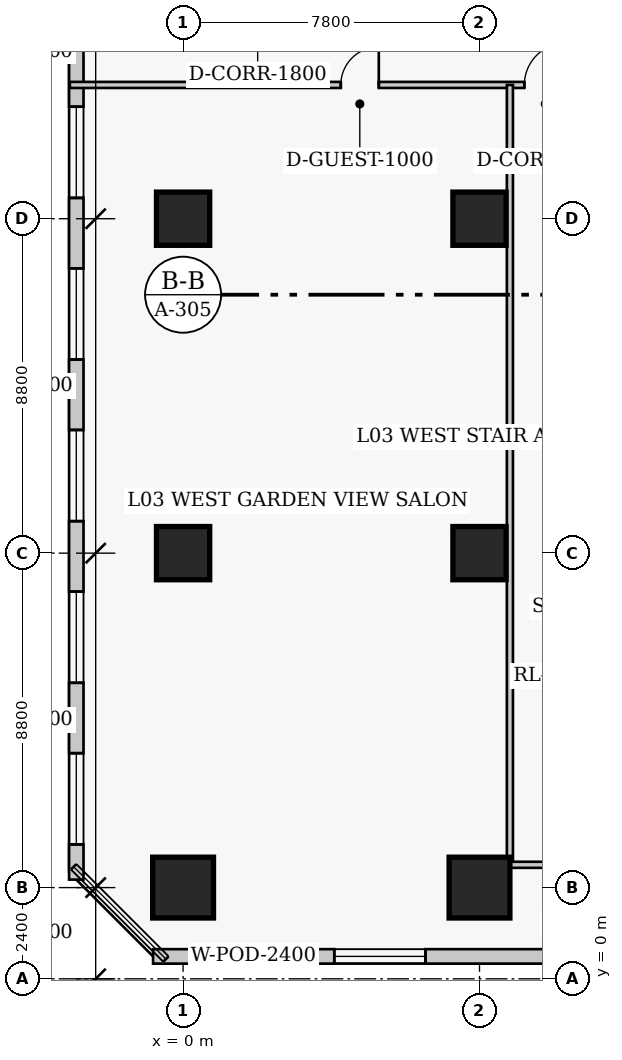
"""IFC4 building model, lengths in metres.
Left out: names, types, materials, properties, quantities, classifications, styles, units other than length and angle.
Written with IfcOpenShell. Run it as: python <this file> out.ifc"""

import sys

from ifc_helpers import new_model, si_unit, direction, frame, frame_2d, origin, origin_2d, place, context, subcontext, project, spatial, rectangle, extrude, element, fill, save


model = new_model("IFC4")
c1 = context("Model", 3, precision=1e-05, world=origin(), true_north=direction((0.0, 1.0)))
c2 = subcontext(c1, "Body", "Model", "MODEL_VIEW")
j1 = project(units=[si_unit("LENGTHUNIT", "METRE"), si_unit("PLANEANGLEUNIT", "RADIAN")], contexts=[c1])
p1 = place(None, origin())
s1 = spatial("IfcSite", under=j1, at=p1, CompositionType="ELEMENT")
p2 = place(p1, origin())
s2 = spatial("IfcBuilding", under=s1, at=p2, CompositionType="ELEMENT")
p3 = place(p2, frame((0.0, 0.0, 15.8)))
s3 = spatial("IfcBuildingStorey", under=s2, at=p3, CompositionType="ELEMENT", Elevation=15.8)
p4 = place(p3, frame((0.0, 2.4, 0.0), z_axis=(0.0, 0.0, 1.0), x_axis=(1.0, 0.0, 0.0)))
e1 = element("IfcColumn", 1, at=p4, inside=s3, PredefinedType="COLUMN", context=c2, shape_type="SweptSolid", body=[
    extrude(rectangle(XDim=1.6, YDim=1.6, at=origin_2d()), origin(), (0.0, 0.0, 1.0), 5.0),
])
for number, where, z_axis, x_axis in (
    (2, (0.0, 11.2, 0.0), (0.0, 0.0, 1.0), (1.0, 0.0, 0.0)),
    (3, (0.0, 20.0, 0.0), (0.0, 0.0, 1.0), (1.0, 0.0, 0.0)),
):
    element("IfcColumn", number, at=place(p3, frame(where, z_axis=z_axis, x_axis=x_axis)), inside=s3, PredefinedType="COLUMN", context=c2, shape_type="SweptSolid", body=[
        extrude(rectangle(XDim=1.4, YDim=1.4, at=origin_2d()), origin(), (0.0, 0.0, 1.0), 5.0),
    ])
p5 = place(p3, frame((7.8, 2.4, 0.0), z_axis=(0.0, 0.0, 1.0), x_axis=(1.0, 0.0, 0.0)))
e4 = element("IfcColumn", 4, at=p5, inside=s3, PredefinedType="COLUMN", context=c2, shape_type="SweptSolid", body=[
    extrude(rectangle(XDim=1.6, YDim=1.6, at=origin_2d()), origin(), (0.0, 0.0, 1.0), 5.0),
])
for number, where, z_axis, x_axis in (
    (5, (7.8, 11.2, 0.0), (0.0, 0.0, 1.0), (1.0, 0.0, 0.0)),
    (6, (7.8, 20.0, 0.0), (0.0, 0.0, 1.0), (1.0, 0.0, 0.0)),
):
    element("IfcColumn", number, at=place(p3, frame(where, z_axis=z_axis, x_axis=x_axis)), inside=s3, PredefinedType="COLUMN", context=c2, shape_type="SweptSolid", body=[
        extrude(rectangle(XDim=1.4, YDim=1.4, at=origin_2d()), origin(), (0.0, 0.0, 1.0), 5.0),
    ])
p6 = place(p3, frame((-0.79, 0.59, 0.0), z_axis=(0.0, 0.0, 1.0), x_axis=(1.0, 0.0, 0.0)))
e7 = element("IfcWall", 7, at=p6, inside=s3, PredefinedType="SOLIDWALL", context=c2, shape_type="SweptSolid", body=[
    extrude(rectangle(XDim=79.58, YDim=0.38, at=frame_2d((39.79, 0.0))), origin(), (0.0, 0.0, 1.0), 4.58),
])
p7 = place(p6, frame((1.439, 0.0, 0.75)))
e8 = element("IfcOpeningElement", 8, at=p7, cuts=e7, PredefinedType="OPENING", context=c2, shape_type="SweptSolid", body=[
    extrude(rectangle(XDim=2.4, YDim=2.2, at=frame_2d((1.2, 1.1))), frame((0.0, 0.2, 0.0), z_axis=(0.0, -1.0, 0.0), x_axis=(1.0, 0.0, 0.0)), (0.0, 0.0, 1.0), 0.4),
])
p8 = place(p6, frame((4.769, 0.0, 0.75)))
e9 = element("IfcOpeningElement", 9, at=p8, cuts=e7, PredefinedType="OPENING", context=c2, shape_type="SweptSolid", body=[
    extrude(rectangle(XDim=2.4, YDim=2.2, at=frame_2d((1.2, 1.1))), frame((0.0, 0.2, 0.0), z_axis=(0.0, -1.0, 0.0), x_axis=(1.0, 0.0, 0.0)), (0.0, 0.0, 1.0), 0.4),
])
p9 = place(p6, frame((16.706, 0.0, 0.75)))
e10 = element("IfcOpeningElement", 10, at=p9, cuts=e7, PredefinedType="OPENING", context=c2, shape_type="SweptSolid", body=[
    extrude(rectangle(XDim=2.4, YDim=2.2, at=frame_2d((1.2, 1.1))), frame((0.0, 0.2, 0.0), z_axis=(0.0, -1.0, 0.0), x_axis=(1.0, 0.0, 0.0)), (0.0, 0.0, 1.0), 0.4),
])
p10 = place(p6, frame((20.685, 0.0, 0.75)))
e11 = element("IfcOpeningElement", 11, at=p10, cuts=e7, PredefinedType="OPENING", context=c2, shape_type="SweptSolid", body=[
    extrude(rectangle(XDim=2.4, YDim=2.2, at=frame_2d((1.2, 1.1))), frame((0.0, 0.2, 0.0), z_axis=(0.0, -1.0, 0.0), x_axis=(1.0, 0.0, 0.0)), (0.0, 0.0, 1.0), 0.4),
])
p11 = place(p6, frame((24.664, 0.0, 0.75)))
e12 = element("IfcOpeningElement", 12, at=p11, cuts=e7, PredefinedType="OPENING", context=c2, shape_type="SweptSolid", body=[
    extrude(rectangle(XDim=2.4, YDim=2.2, at=frame_2d((1.2, 1.1))), frame((0.0, 0.2, 0.0), z_axis=(0.0, -1.0, 0.0), x_axis=(1.0, 0.0, 0.0)), (0.0, 0.0, 1.0), 0.4),
])
p12 = place(p6, frame((28.643, 0.0, 0.75)))
e13 = element("IfcOpeningElement", 13, at=p12, cuts=e7, PredefinedType="OPENING", context=c2, shape_type="SweptSolid", body=[
    extrude(rectangle(XDim=2.4, YDim=2.2, at=frame_2d((1.2, 1.1))), frame((0.0, 0.2, 0.0), z_axis=(0.0, -1.0, 0.0), x_axis=(1.0, 0.0, 0.0)), (0.0, 0.0, 1.0), 0.4),
])
p13 = place(p6, frame((32.622, 0.0, 0.75)))
e14 = element("IfcOpeningElement", 14, at=p13, cuts=e7, PredefinedType="OPENING", context=c2, shape_type="SweptSolid", body=[
    extrude(rectangle(XDim=2.4, YDim=2.2, at=frame_2d((1.2, 1.1))), frame((0.0, 0.2, 0.0), z_axis=(0.0, -1.0, 0.0), x_axis=(1.0, 0.0, 0.0)), (0.0, 0.0, 1.0), 0.4),
])
p14 = place(p6, frame((37.75, 0.0, 0.75)))
e15 = element("IfcOpeningElement", 15, at=p14, cuts=e7, PredefinedType="OPENING", context=c2, shape_type="SweptSolid", body=[
    extrude(rectangle(XDim=2.4, YDim=2.2, at=frame_2d((1.2, 1.1))), frame((0.0, 0.2, 0.0), z_axis=(0.0, -1.0, 0.0), x_axis=(1.0, 0.0, 0.0)), (0.0, 0.0, 1.0), 0.4),
])
p15 = place(p6, frame((44.559, 0.0, 0.75)))
e16 = element("IfcOpeningElement", 16, at=p15, cuts=e7, PredefinedType="OPENING", context=c2, shape_type="SweptSolid", body=[
    extrude(rectangle(XDim=2.4, YDim=2.2, at=frame_2d((1.2, 1.1))), frame((0.0, 0.2, 0.0), z_axis=(0.0, -1.0, 0.0), x_axis=(1.0, 0.0, 0.0)), (0.0, 0.0, 1.0), 0.4),
])
p16 = place(p6, frame((48.538, 0.0, 0.75)))
e17 = element("IfcOpeningElement", 17, at=p16, cuts=e7, PredefinedType="OPENING", context=c2, shape_type="SweptSolid", body=[
    extrude(rectangle(XDim=2.4, YDim=2.2, at=frame_2d((1.2, 1.1))), frame((0.0, 0.2, 0.0), z_axis=(0.0, -1.0, 0.0), x_axis=(1.0, 0.0, 0.0)), (0.0, 0.0, 1.0), 0.4),
])
p17 = place(p6, frame((56.496, 0.0, 0.75)))
e18 = element("IfcOpeningElement", 18, at=p17, cuts=e7, PredefinedType="OPENING", context=c2, shape_type="SweptSolid", body=[
    extrude(rectangle(XDim=2.4, YDim=2.2, at=frame_2d((1.2, 1.1))), frame((0.0, 0.2, 0.0), z_axis=(0.0, -1.0, 0.0), x_axis=(1.0, 0.0, 0.0)), (0.0, 0.0, 1.0), 0.4),
])
p18 = place(p6, frame((60.475, 0.0, 0.75)))
e19 = element("IfcOpeningElement", 19, at=p18, cuts=e7, PredefinedType="OPENING", context=c2, shape_type="SweptSolid", body=[
    extrude(rectangle(XDim=2.4, YDim=2.2, at=frame_2d((1.2, 1.1))), frame((0.0, 0.2, 0.0), z_axis=(0.0, -1.0, 0.0), x_axis=(1.0, 0.0, 0.0)), (0.0, 0.0, 1.0), 0.4),
])
p19 = place(p6, frame((64.454, 0.0, 0.75)))
e20 = element("IfcOpeningElement", 20, at=p19, cuts=e7, PredefinedType="OPENING", context=c2, shape_type="SweptSolid", body=[
    extrude(rectangle(XDim=2.4, YDim=2.2, at=frame_2d((1.2, 1.1))), frame((0.0, 0.2, 0.0), z_axis=(0.0, -1.0, 0.0), x_axis=(1.0, 0.0, 0.0)), (0.0, 0.0, 1.0), 0.4),
])
p20 = place(p6, frame((68.433, 0.0, 0.75)))
e21 = element("IfcOpeningElement", 21, at=p20, cuts=e7, PredefinedType="OPENING", context=c2, shape_type="SweptSolid", body=[
    extrude(rectangle(XDim=2.4, YDim=2.2, at=frame_2d((1.2, 1.1))), frame((0.0, 0.2, 0.0), z_axis=(0.0, -1.0, 0.0), x_axis=(1.0, 0.0, 0.0)), (0.0, 0.0, 1.0), 0.4),
])
p21 = place(p6, frame((72.412, 0.0, 0.75)))
e22 = element("IfcOpeningElement", 22, at=p21, cuts=e7, PredefinedType="OPENING", context=c2, shape_type="SweptSolid", body=[
    extrude(rectangle(XDim=2.4, YDim=2.2, at=frame_2d((1.2, 1.1))), frame((0.0, 0.2, 0.0), z_axis=(0.0, -1.0, 0.0), x_axis=(1.0, 0.0, 0.0)), (0.0, 0.0, 1.0), 0.4),
])
p22 = place(p6, frame((75.74, 0.0, 0.75)))
e23 = element("IfcOpeningElement", 23, at=p22, cuts=e7, PredefinedType="OPENING", context=c2, shape_type="SweptSolid", body=[
    extrude(rectangle(XDim=2.4, YDim=2.2, at=frame_2d((1.2, 1.1))), frame((0.0, 0.2, 0.0), z_axis=(0.0, -1.0, 0.0), x_axis=(1.0, 0.0, 0.0)), (0.0, 0.0, 1.0), 0.4),
])
p23 = place(p3, frame((-2.81, 49.39, 0.0), z_axis=(0.0, 0.0, 1.0), x_axis=(0.0, -1.0, 0.0)))
e24 = element("IfcWall", 24, at=p23, inside=s3, PredefinedType="SOLIDWALL", context=c2, shape_type="SweptSolid", body=[
    extrude(rectangle(XDim=46.78, YDim=0.38, at=frame_2d((23.39, 0.0))), origin(), (0.0, 0.0, 1.0), 4.58),
])
p24 = place(p23, frame((0.927, 0.0, 0.75)))
e25 = element("IfcOpeningElement", 25, at=p24, cuts=e24, PredefinedType="OPENING", context=c2, shape_type="SweptSolid", body=[
    extrude(rectangle(XDim=2.4, YDim=2.2, at=frame_2d((1.2, 1.1))), frame((0.0, 0.2, 0.0), z_axis=(0.0, -1.0, 0.0), x_axis=(1.0, 0.0, 0.0)), (0.0, 0.0, 1.0), 0.4),
])
p25 = place(p23, frame((5.179, 0.0, 0.75)))
e26 = element("IfcOpeningElement", 26, at=p25, cuts=e24, PredefinedType="OPENING", context=c2, shape_type="SweptSolid", body=[
    extrude(rectangle(XDim=2.4, YDim=2.2, at=frame_2d((1.2, 1.1))), frame((0.0, 0.2, 0.0), z_axis=(0.0, -1.0, 0.0), x_axis=(1.0, 0.0, 0.0)), (0.0, 0.0, 1.0), 0.4),
])
p26 = place(p23, frame((9.432, 0.0, 0.75)))
e27 = element("IfcOpeningElement", 27, at=p26, cuts=e24, PredefinedType="OPENING", context=c2, shape_type="SweptSolid", body=[
    extrude(rectangle(XDim=2.4, YDim=2.2, at=frame_2d((1.2, 1.1))), frame((0.0, 0.2, 0.0), z_axis=(0.0, -1.0, 0.0), x_axis=(1.0, 0.0, 0.0)), (0.0, 0.0, 1.0), 0.4),
])
p27 = place(p23, frame((13.685, 0.0, 0.75)))
e28 = element("IfcOpeningElement", 28, at=p27, cuts=e24, PredefinedType="OPENING", context=c2, shape_type="SweptSolid", body=[
    extrude(rectangle(XDim=2.4, YDim=2.2, at=frame_2d((1.2, 1.1))), frame((0.0, 0.2, 0.0), z_axis=(0.0, -1.0, 0.0), x_axis=(1.0, 0.0, 0.0)), (0.0, 0.0, 1.0), 0.4),
])
p28 = place(p23, frame((17.937, 0.0, 0.75)))
e29 = element("IfcOpeningElement", 29, at=p28, cuts=e24, PredefinedType="OPENING", context=c2, shape_type="SweptSolid", body=[
    extrude(rectangle(XDim=2.4, YDim=2.2, at=frame_2d((1.2, 1.1))), frame((0.0, 0.2, 0.0), z_axis=(0.0, -1.0, 0.0), x_axis=(1.0, 0.0, 0.0)), (0.0, 0.0, 1.0), 0.4),
])
p29 = place(p23, frame((26.443, 0.0, 0.75)))
e30 = element("IfcOpeningElement", 30, at=p29, cuts=e24, PredefinedType="OPENING", context=c2, shape_type="SweptSolid", body=[
    extrude(rectangle(XDim=2.4, YDim=2.2, at=frame_2d((1.2, 1.1))), frame((0.0, 0.2, 0.0), z_axis=(0.0, -1.0, 0.0), x_axis=(1.0, 0.0, 0.0)), (0.0, 0.0, 1.0), 0.4),
])
p30 = place(p23, frame((30.696, 0.0, 0.75)))
e31 = element("IfcOpeningElement", 31, at=p30, cuts=e24, PredefinedType="OPENING", context=c2, shape_type="SweptSolid", body=[
    extrude(rectangle(XDim=2.4, YDim=2.2, at=frame_2d((1.2, 1.1))), frame((0.0, 0.2, 0.0), z_axis=(0.0, -1.0, 0.0), x_axis=(1.0, 0.0, 0.0)), (0.0, 0.0, 1.0), 0.4),
])
p31 = place(p23, frame((34.948, 0.0, 0.75)))
e32 = element("IfcOpeningElement", 32, at=p31, cuts=e24, PredefinedType="OPENING", context=c2, shape_type="SweptSolid", body=[
    extrude(rectangle(XDim=2.4, YDim=2.2, at=frame_2d((1.2, 1.1))), frame((0.0, 0.2, 0.0), z_axis=(0.0, -1.0, 0.0), x_axis=(1.0, 0.0, 0.0)), (0.0, 0.0, 1.0), 0.4),
])
p32 = place(p23, frame((39.201, 0.0, 0.75)))
e33 = element("IfcOpeningElement", 33, at=p32, cuts=e24, PredefinedType="OPENING", context=c2, shape_type="SweptSolid", body=[
    extrude(rectangle(XDim=2.4, YDim=2.2, at=frame_2d((1.2, 1.1))), frame((0.0, 0.2, 0.0), z_axis=(0.0, -1.0, 0.0), x_axis=(1.0, 0.0, 0.0)), (0.0, 0.0, 1.0), 0.4),
])
p33 = place(p23, frame((43.454, 0.0, 0.75)))
e34 = element("IfcOpeningElement", 34, at=p33, cuts=e24, PredefinedType="OPENING", context=c2, shape_type="SweptSolid", body=[
    extrude(rectangle(XDim=2.4, YDim=2.2, at=frame_2d((1.2, 1.1))), frame((0.0, 0.2, 0.0), z_axis=(0.0, -1.0, 0.0), x_axis=(1.0, 0.0, 0.0)), (0.0, 0.0, 1.0), 0.4),
])
p34 = place(p3, frame((-2.98, 23.52, 0.0), z_axis=(0.0, 0.0, 1.0), x_axis=(1.0, 0.0, 0.0)))
e35 = element("IfcWall", 35, at=p34, inside=s3, PredefinedType="PARTITIONING", context=c2, shape_type="SweptSolid", body=[
    extrude(rectangle(XDim=83.96, YDim=0.16, at=frame_2d((41.98, 0.0))), origin(), (0.0, 0.0, 1.0), 4.58),
])
p35 = place(p34, frame((7.13, 0.0, 0.0)))
e36 = element("IfcOpeningElement", 36, at=p35, cuts=e35, PredefinedType="OPENING", context=c2, shape_type="SweptSolid", body=[
    extrude(rectangle(XDim=1.0, YDim=2.15, at=frame_2d((0.5, 1.075))), frame((0.0, 0.09, 0.0), z_axis=(0.0, -1.0, 0.0), x_axis=(1.0, 0.0, 0.0)), (0.0, 0.0, 1.0), 0.18),
])
p36 = place(p34, frame((11.96, 0.0, 0.0)))
e37 = element("IfcOpeningElement", 37, at=p36, cuts=e35, PredefinedType="OPENING", context=c2, shape_type="SweptSolid", body=[
    extrude(rectangle(XDim=1.1, YDim=2.15, at=frame_2d((0.55, 1.075))), frame((0.0, 0.09, 0.0), z_axis=(0.0, -1.0, 0.0), x_axis=(1.0, 0.0, 0.0)), (0.0, 0.0, 1.0), 0.18),
])
p37 = place(p34, frame((15.205, 0.0, 0.0)))
e38 = element("IfcOpeningElement", 38, at=p37, cuts=e35, PredefinedType="OPENING", context=c2, shape_type="SweptSolid", body=[
    extrude(rectangle(XDim=0.95, YDim=2.1, at=frame_2d((0.475, 1.05))), frame((0.0, 0.09, 0.0), z_axis=(0.0, -1.0, 0.0), x_axis=(1.0, 0.0, 0.0)), (0.0, 0.0, 1.0), 0.18),
])
p38 = place(p34, frame((26.88, 0.0, 0.0)))
e39 = element("IfcOpeningElement", 39, at=p38, cuts=e35, PredefinedType="OPENING", context=c2, shape_type="SweptSolid", body=[
    extrude(rectangle(XDim=2.2, YDim=2.4, at=frame_2d((1.1, 1.2))), frame((0.0, 0.09, 0.0), z_axis=(0.0, -1.0, 0.0), x_axis=(1.0, 0.0, 0.0)), (0.0, 0.0, 1.0), 0.18),
])
p39 = place(p34, frame((37.88, 0.0, 0.0)))
e40 = element("IfcOpeningElement", 40, at=p39, cuts=e35, PredefinedType="OPENING", context=c2, shape_type="SweptSolid", body=[
    extrude(rectangle(XDim=2.2, YDim=2.4, at=frame_2d((1.1, 1.2))), frame((0.0, 0.09, 0.0), z_axis=(0.0, -1.0, 0.0), x_axis=(1.0, 0.0, 0.0)), (0.0, 0.0, 1.0), 0.18),
])
p40 = place(p34, frame((48.63, 0.0, 0.0)))
e41 = element("IfcOpeningElement", 41, at=p40, cuts=e35, PredefinedType="OPENING", context=c2, shape_type="SweptSolid", body=[
    extrude(rectangle(XDim=2.2, YDim=2.4, at=frame_2d((1.1, 1.2))), frame((0.0, 0.09, 0.0), z_axis=(0.0, -1.0, 0.0), x_axis=(1.0, 0.0, 0.0)), (0.0, 0.0, 1.0), 0.18),
])
p41 = place(p34, frame((59.08, 0.0, 0.0)))
e42 = element("IfcOpeningElement", 42, at=p41, cuts=e35, PredefinedType="OPENING", context=c2, shape_type="SweptSolid", body=[
    extrude(rectangle(XDim=2.2, YDim=2.4, at=frame_2d((1.1, 1.2))), frame((0.0, 0.09, 0.0), z_axis=(0.0, -1.0, 0.0), x_axis=(1.0, 0.0, 0.0)), (0.0, 0.0, 1.0), 0.18),
])
p42 = place(p34, frame((67.34, 0.0, 0.0)))
e43 = element("IfcOpeningElement", 43, at=p42, cuts=e35, PredefinedType="OPENING", context=c2, shape_type="SweptSolid", body=[
    extrude(rectangle(XDim=0.88, YDim=2.05, at=frame_2d((0.44, 1.025))), frame((0.0, 0.09, 0.0), z_axis=(0.0, -1.0, 0.0), x_axis=(1.0, 0.0, 0.0)), (0.0, 0.0, 1.0), 0.18),
])
p43 = place(p34, frame((76.29, 0.0, 0.0)))
e44 = element("IfcOpeningElement", 44, at=p43, cuts=e35, PredefinedType="OPENING", context=c2, shape_type="SweptSolid", body=[
    extrude(rectangle(XDim=0.88, YDim=2.05, at=frame_2d((0.44, 1.025))), frame((0.0, 0.09, 0.0), z_axis=(0.0, -1.0, 0.0), x_axis=(1.0, 0.0, 0.0)), (0.0, 0.0, 1.0), 0.18),
])
p44 = place(p3, frame((8.6, 3.0, 0.0), z_axis=(0.0, 0.0, 1.0), x_axis=(0.0, 1.0, 0.0)))
e45 = element("IfcWall", 45, at=p44, inside=s3, PredefinedType="PARTITIONING", context=c2, shape_type="SweptSolid", body=[
    extrude(rectangle(XDim=20.52, YDim=0.16, at=frame_2d((10.26, 0.0))), origin(), (0.0, 0.0, 1.0), 4.58),
])
p45 = place(p3, frame((8.6, 3.0, 0.0), z_axis=(0.0, 0.0, 1.0), x_axis=(1.0, 0.0, 0.0)))
e46 = element("IfcWall", 46, at=p45, inside=s3, PredefinedType="PARTITIONING", context=c2, shape_type="SweptSolid", body=[
    extrude(rectangle(XDim=1.79, YDim=0.16, at=frame_2d((0.895, 0.0))), origin(), (0.0, 0.0, 1.0), 4.58),
])
p46 = place(p7, origin())
e47 = element("IfcWindow", 47, at=p46, inside=s3, PartitioningType="SINGLE_PANEL", PredefinedType="WINDOW", context=c2, shape_type="SweptSolid", body=[
    extrude(rectangle(XDim=2.4, YDim=2.2, at=frame_2d((1.2, 1.1))), frame((0.0, 0.03, 0.0), z_axis=(0.0, -1.0, 0.0), x_axis=(1.0, 0.0, 0.0)), (0.0, 0.0, 1.0), 0.06),
])
fill(e8, e47)
p47 = place(p8, origin())
e48 = element("IfcWindow", 48, at=p47, inside=s3, PartitioningType="SINGLE_PANEL", PredefinedType="WINDOW", context=c2, shape_type="SweptSolid", body=[
    extrude(rectangle(XDim=2.4, YDim=2.2, at=frame_2d((1.2, 1.1))), frame((0.0, 0.03, 0.0), z_axis=(0.0, -1.0, 0.0), x_axis=(1.0, 0.0, 0.0)), (0.0, 0.0, 1.0), 0.06),
])
fill(e9, e48)
p48 = place(p29, origin())
e49 = element("IfcWindow", 49, at=p48, inside=s3, PartitioningType="SINGLE_PANEL", PredefinedType="WINDOW", context=c2, shape_type="SweptSolid", body=[
    extrude(rectangle(XDim=2.4, YDim=2.2, at=frame_2d((1.2, 1.1))), frame((0.0, 0.03, 0.0), z_axis=(0.0, -1.0, 0.0), x_axis=(1.0, 0.0, 0.0)), (0.0, 0.0, 1.0), 0.06),
])
fill(e30, e49)
p49 = place(p30, origin())
e50 = element("IfcWindow", 50, at=p49, inside=s3, PartitioningType="SINGLE_PANEL", PredefinedType="WINDOW", context=c2, shape_type="SweptSolid", body=[
    extrude(rectangle(XDim=2.4, YDim=2.2, at=frame_2d((1.2, 1.1))), frame((0.0, 0.03, 0.0), z_axis=(0.0, -1.0, 0.0), x_axis=(1.0, 0.0, 0.0)), (0.0, 0.0, 1.0), 0.06),
])
fill(e31, e50)
p50 = place(p31, origin())
e51 = element("IfcWindow", 51, at=p50, inside=s3, PartitioningType="SINGLE_PANEL", PredefinedType="WINDOW", context=c2, shape_type="SweptSolid", body=[
    extrude(rectangle(XDim=2.4, YDim=2.2, at=frame_2d((1.2, 1.1))), frame((0.0, 0.03, 0.0), z_axis=(0.0, -1.0, 0.0), x_axis=(1.0, 0.0, 0.0)), (0.0, 0.0, 1.0), 0.06),
])
fill(e32, e51)
p51 = place(p32, origin())
e52 = element("IfcWindow", 52, at=p51, inside=s3, PartitioningType="SINGLE_PANEL", PredefinedType="WINDOW", context=c2, shape_type="SweptSolid", body=[
    extrude(rectangle(XDim=2.4, YDim=2.2, at=frame_2d((1.2, 1.1))), frame((0.0, 0.03, 0.0), z_axis=(0.0, -1.0, 0.0), x_axis=(1.0, 0.0, 0.0)), (0.0, 0.0, 1.0), 0.06),
])
fill(e33, e52)
p52 = place(p33, origin())
e53 = element("IfcWindow", 53, at=p52, inside=s3, PartitioningType="SINGLE_PANEL", PredefinedType="WINDOW", context=c2, shape_type="SweptSolid", body=[
    extrude(rectangle(XDim=2.4, YDim=2.2, at=frame_2d((1.2, 1.1))), frame((0.0, 0.03, 0.0), z_axis=(0.0, -1.0, 0.0), x_axis=(1.0, 0.0, 0.0)), (0.0, 0.0, 1.0), 0.06),
])
fill(e34, e53)
p53 = place(p35, origin())
e54 = element("IfcDoor", 54, at=p53, inside=s3, OperationType="SINGLE_SWING_RIGHT", PredefinedType="DOOR", context=c2, shape_type="SweptSolid", body=[
    extrude(rectangle(XDim=1.0, YDim=2.15, at=frame_2d((0.5, 1.075))), frame((0.0, 0.025, 0.0), z_axis=(0.0, -1.0, 0.0), x_axis=(1.0, 0.0, 0.0)), (0.0, 0.0, 1.0), 0.05),
])
fill(e36, e54)
p54 = place(p36, origin())
e55 = element("IfcDoor", 55, at=p54, inside=s3, OperationType="SINGLE_SWING_RIGHT", PredefinedType="DOOR", context=c2, shape_type="SweptSolid", body=[
    extrude(rectangle(XDim=1.1, YDim=2.15, at=frame_2d((0.55, 1.075))), frame((0.0, 0.025, 0.0), z_axis=(0.0, -1.0, 0.0), x_axis=(1.0, 0.0, 0.0)), (0.0, 0.0, 1.0), 0.05),
])
fill(e37, e55)
save(model, sys.argv[1])
